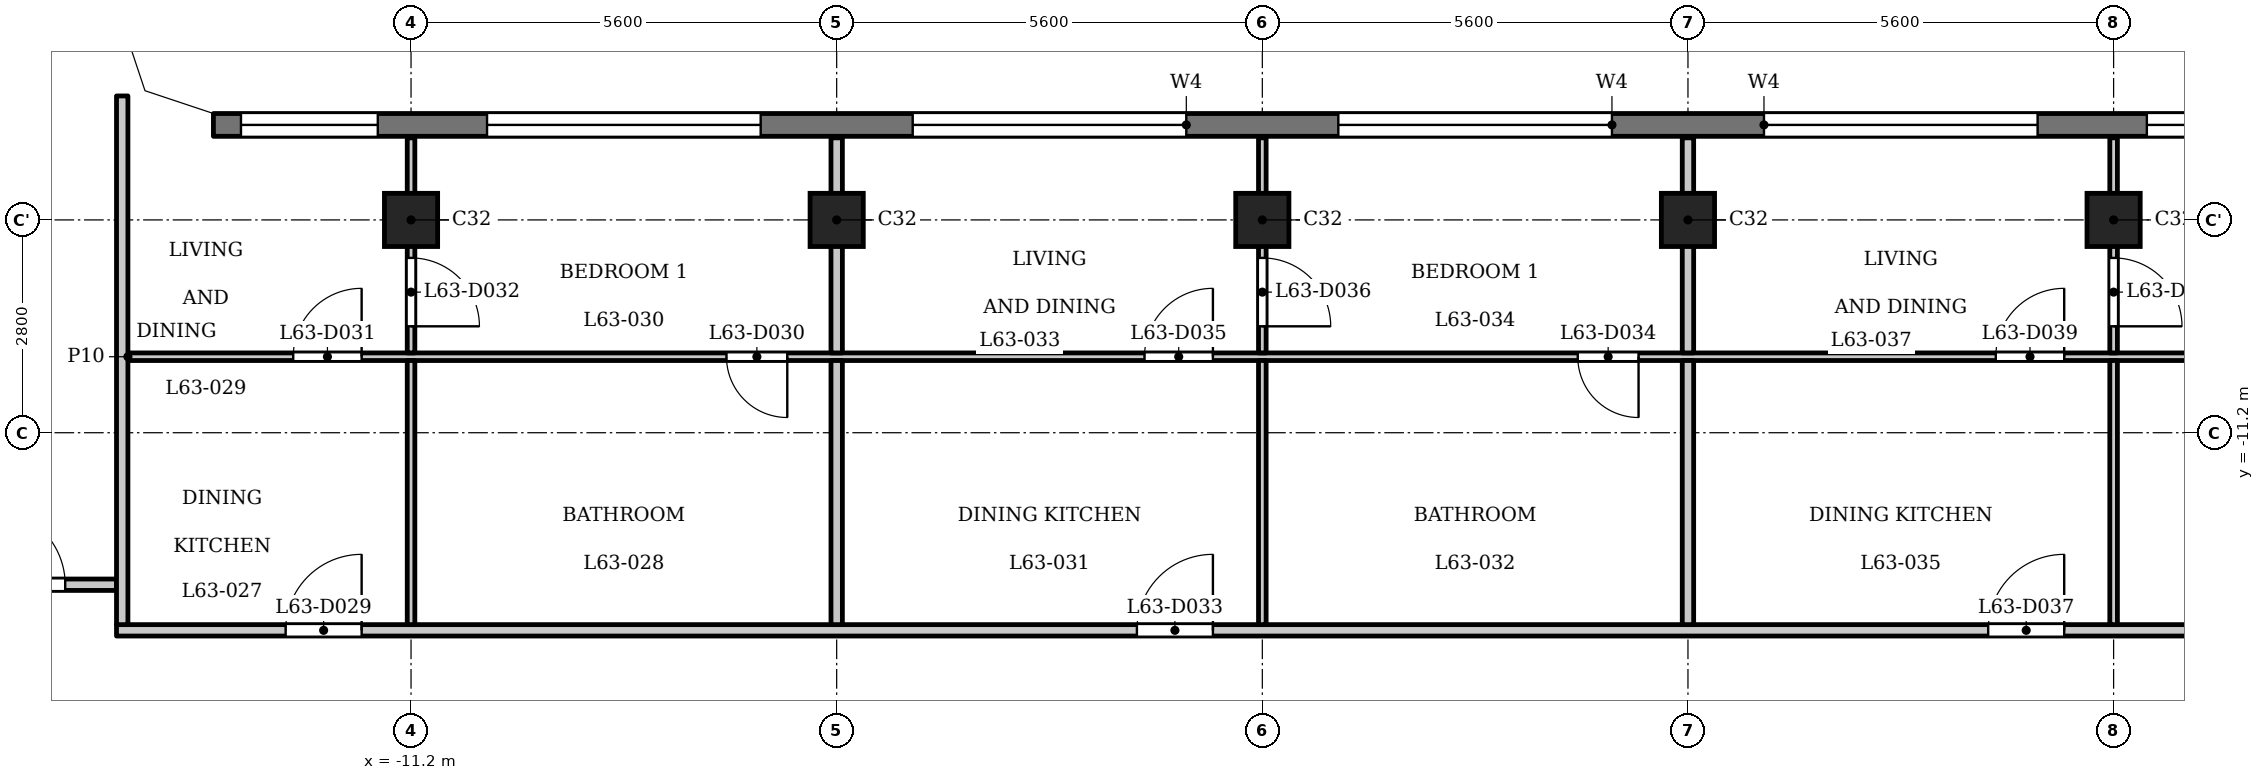
"""IFC4 building model, lengths in metres.
Left out: names, types, materials, properties, quantities, classifications, styles, units other than length and angle.
Written with IfcOpenShell. Run it as: python <this file> out.ifc"""

import sys

from ifc_helpers import new_model, si_unit, direction, frame, frame_2d, origin, origin_2d, place, context, subcontext, project, spatial, polyline, rectangle, outline, extrude, element, fill, save


model = new_model("IFC4")
c1 = context("Model", 3, precision=1e-05, world=origin(), true_north=direction((0.0, 1.0)))
c2 = subcontext(c1, "Body", "Model", "MODEL_VIEW")
j1 = project(units=[si_unit("LENGTHUNIT", "METRE"), si_unit("PLANEANGLEUNIT", "RADIAN")], contexts=[c1])
p1 = place(None, origin())
s1 = spatial("IfcSite", under=j1, at=p1, CompositionType="ELEMENT")
p2 = place(p1, origin())
s2 = spatial("IfcBuilding", under=s1, at=p2, CompositionType="ELEMENT")
p3 = place(p2, frame((0.0, 0.0, 245.2)))
s3 = spatial("IfcBuildingStorey", under=s2, at=p3, CompositionType="ELEMENT", Elevation=245.2)
for number, where, z_axis, x_axis in (
    (1, (-11.2, -8.4, 0.0), (0.0, 0.0, 1.0), (1.0, 0.0, 0.0)),
    (2, (-5.6, -8.4, 0.0), (0.0, 0.0, 1.0), (1.0, 0.0, 0.0)),
    (3, (0.0, -8.4, 0.0), (0.0, 0.0, 1.0), (1.0, 0.0, 0.0)),
    (4, (5.6, -8.4, 0.0), (0.0, 0.0, 1.0), (1.0, 0.0, 0.0)),
    (5, (11.2, -8.4, 0.0), (0.0, 0.0, 1.0), (1.0, 0.0, 0.0)),
):
    element("IfcColumn", number, at=place(p3, frame(where, z_axis=z_axis, x_axis=x_axis)), inside=s3, PredefinedType="COLUMN", context=c2, shape_type="SweptSolid", body=[
        extrude(rectangle(XDim=0.7, YDim=0.7, at=origin_2d()), origin(), (0.0, 0.0, 1.0), 3.5),
    ])
p4 = place(p3, frame((13.8, -7.15, 0.0), z_axis=(0.0, 0.0, 1.0), x_axis=(-1.0, 0.0, 0.0)))
e6 = element("IfcWall", 6, at=p4, inside=s3, PredefinedType="SOLIDWALL", context=c2, shape_type="SweptSolid", body=[
    extrude(rectangle(XDim=27.6, YDim=0.3, at=frame_2d((13.8, 0.0))), origin(), (0.0, 0.0, 1.0), 3.2),
])
p5 = place(p4, frame((0.363, 0.0, 0.9)))
e7 = element("IfcOpeningElement", 7, at=p5, cuts=e6, PredefinedType="OPENING", context=c2, shape_type="SweptSolid", body=[
    extrude(rectangle(XDim=1.8, YDim=1.25, at=frame_2d((0.9, 0.625))), frame((0.0, 0.16, 0.0), z_axis=(0.0, -1.0, 0.0), x_axis=(1.0, 0.0, 0.0)), (0.0, 0.0, 1.0), 0.32),
])
p6 = place(p4, frame((3.6, 0.0, 1.2)))
e8 = element("IfcOpeningElement", 8, at=p6, cuts=e6, PredefinedType="OPENING", context=c2, shape_type="SweptSolid", body=[
    extrude(rectangle(XDim=3.6, YDim=0.95, at=frame_2d((1.8, 0.475))), frame((0.0, 0.16, 0.0), z_axis=(0.0, -1.0, 0.0), x_axis=(1.0, 0.0, 0.0)), (0.0, 0.0, 1.0), 0.32),
])
p7 = place(p4, frame((9.2, 0.0, 1.2)))
e9 = element("IfcOpeningElement", 9, at=p7, cuts=e6, PredefinedType="OPENING", context=c2, shape_type="SweptSolid", body=[
    extrude(rectangle(XDim=3.6, YDim=0.95, at=frame_2d((1.8, 0.475))), frame((0.0, 0.16, 0.0), z_axis=(0.0, -1.0, 0.0), x_axis=(1.0, 0.0, 0.0)), (0.0, 0.0, 1.0), 0.32),
])
p8 = place(p4, frame((14.8, 0.0, 1.2)))
e10 = element("IfcOpeningElement", 10, at=p8, cuts=e6, PredefinedType="OPENING", context=c2, shape_type="SweptSolid", body=[
    extrude(rectangle(XDim=3.6, YDim=0.95, at=frame_2d((1.8, 0.475))), frame((0.0, 0.16, 0.0), z_axis=(0.0, -1.0, 0.0), x_axis=(1.0, 0.0, 0.0)), (0.0, 0.0, 1.0), 0.32),
])
p9 = place(p4, frame((20.4, 0.0, 1.2)))
e11 = element("IfcOpeningElement", 11, at=p9, cuts=e6, PredefinedType="OPENING", context=c2, shape_type="SweptSolid", body=[
    extrude(rectangle(XDim=3.6, YDim=0.95, at=frame_2d((1.8, 0.475))), frame((0.0, 0.16, 0.0), z_axis=(0.0, -1.0, 0.0), x_axis=(1.0, 0.0, 0.0)), (0.0, 0.0, 1.0), 0.32),
])
p10 = place(p4, frame((25.438, 0.0, 0.9)))
e12 = element("IfcOpeningElement", 12, at=p10, cuts=e6, PredefinedType="OPENING", context=c2, shape_type="SweptSolid", body=[
    extrude(rectangle(XDim=1.8, YDim=1.25, at=frame_2d((0.9, 0.625))), frame((0.0, 0.16, 0.0), z_axis=(0.0, -1.0, 0.0), x_axis=(1.0, 0.0, 0.0)), (0.0, 0.0, 1.0), 0.32),
])
p11 = place(p3, frame((-15.075, -13.8, 0.0), z_axis=(0.0, 0.0, 1.0), x_axis=(1.0, 0.0, 0.0)))
e13 = element("IfcWall", 13, at=p11, inside=s3, PredefinedType="PARTITIONING", context=c2, shape_type="SweptSolid", body=[
    extrude(rectangle(XDim=30.15, YDim=0.15, at=frame_2d((15.075, 0.0))), origin(), (0.0, 0.0, 1.0), 3.2),
])
p12 = place(p11, frame((2.225, 0.0, 0.0)))
e14 = element("IfcOpeningElement", 14, at=p12, cuts=e13, PredefinedType="OPENING", context=c2, shape_type="SweptSolid", body=[
    extrude(rectangle(XDim=1.0, YDim=2.1, at=frame_2d((0.5, 1.05))), frame((0.0, 0.085, 0.0), z_axis=(0.0, -1.0, 0.0), x_axis=(1.0, 0.0, 0.0)), (0.0, 0.0, 1.0), 0.17),
])
p13 = place(p11, frame((13.425, 0.0, 0.0)))
e15 = element("IfcOpeningElement", 15, at=p13, cuts=e13, PredefinedType="OPENING", context=c2, shape_type="SweptSolid", body=[
    extrude(rectangle(XDim=1.0, YDim=2.1, at=frame_2d((0.5, 1.05))), frame((0.0, 0.085, 0.0), z_axis=(0.0, -1.0, 0.0), x_axis=(1.0, 0.0, 0.0)), (0.0, 0.0, 1.0), 0.17),
])
p14 = place(p11, frame((24.625, 0.0, 0.0)))
e16 = element("IfcOpeningElement", 16, at=p14, cuts=e13, PredefinedType="OPENING", context=c2, shape_type="SweptSolid", body=[
    extrude(rectangle(XDim=1.0, YDim=2.1, at=frame_2d((0.5, 1.05))), frame((0.0, 0.085, 0.0), z_axis=(0.0, -1.0, 0.0), x_axis=(1.0, 0.0, 0.0)), (0.0, 0.0, 1.0), 0.17),
])
p15 = place(p3, frame((-17.4, -13.2, 0.0), z_axis=(0.0, 0.0, 1.0), x_axis=(1.0, 0.0, 0.0)))
e17 = element("IfcWall", 17, at=p15, inside=s3, PredefinedType="PARTITIONING", context=c2, shape_type="SweptSolid", body=[
    extrude(rectangle(XDim=2.325, YDim=0.15, at=frame_2d((1.163, 0.0))), origin(), (0.0, 0.0, 1.0), 3.2),
])
p16 = place(p15, frame((0.65, 0.0, 0.0)))
e18 = element("IfcOpeningElement", 18, at=p16, cuts=e17, PredefinedType="OPENING", context=c2, shape_type="SweptSolid", body=[
    extrude(rectangle(XDim=1.0, YDim=2.1, at=frame_2d((0.5, 1.05))), frame((0.0, 0.085, 0.0), z_axis=(0.0, -1.0, 0.0), x_axis=(1.0, 0.0, 0.0)), (0.0, 0.0, 1.0), 0.17),
])
p17 = place(p3, frame((-14.925, -10.2, 0.0), z_axis=(0.0, 0.0, 1.0), x_axis=(1.0, 0.0, 0.0)))
e19 = element("IfcWall", 19, at=p17, inside=s3, PredefinedType="PARTITIONING", context=c2, shape_type="SweptSolid", body=[
    extrude(rectangle(XDim=29.85, YDim=0.1, at=frame_2d((14.925, 0.0))), origin(), (0.0, 0.0, 1.0), 3.2),
])
p18 = place(p17, frame((7.875, 0.0, 0.0)))
e20 = element("IfcOpeningElement", 20, at=p18, cuts=e19, PredefinedType="OPENING", context=c2, shape_type="SweptSolid", body=[
    extrude(rectangle(XDim=0.8, YDim=2.1, at=frame_2d((0.4, 1.05))), frame((0.0, 0.06, 0.0), z_axis=(0.0, -1.0, 0.0), x_axis=(1.0, 0.0, 0.0)), (0.0, 0.0, 1.0), 0.12),
])
p19 = place(p17, frame((2.175, 0.0, 0.0)))
e21 = element("IfcOpeningElement", 21, at=p19, cuts=e19, PredefinedType="OPENING", context=c2, shape_type="SweptSolid", body=[
    extrude(rectangle(XDim=0.9, YDim=2.1, at=frame_2d((0.45, 1.05))), frame((0.0, 0.06, 0.0), z_axis=(0.0, -1.0, 0.0), x_axis=(1.0, 0.0, 0.0)), (0.0, 0.0, 1.0), 0.12),
])
p20 = place(p17, frame((19.075, 0.0, 0.0)))
e22 = element("IfcOpeningElement", 22, at=p20, cuts=e19, PredefinedType="OPENING", context=c2, shape_type="SweptSolid", body=[
    extrude(rectangle(XDim=0.8, YDim=2.1, at=frame_2d((0.4, 1.05))), frame((0.0, 0.06, 0.0), z_axis=(0.0, -1.0, 0.0), x_axis=(1.0, 0.0, 0.0)), (0.0, 0.0, 1.0), 0.12),
])
p21 = place(p17, frame((13.375, 0.0, 0.0)))
e23 = element("IfcOpeningElement", 23, at=p21, cuts=e19, PredefinedType="OPENING", context=c2, shape_type="SweptSolid", body=[
    extrude(rectangle(XDim=0.9, YDim=2.1, at=frame_2d((0.45, 1.05))), frame((0.0, 0.06, 0.0), z_axis=(0.0, -1.0, 0.0), x_axis=(1.0, 0.0, 0.0)), (0.0, 0.0, 1.0), 0.12),
])
p22 = place(p17, frame((28.525, 0.0, 0.0)))
e24 = element("IfcOpeningElement", 24, at=p22, cuts=e19, PredefinedType="OPENING", context=c2, shape_type="SweptSolid", body=[
    extrude(rectangle(XDim=0.8, YDim=2.1, at=frame_2d((0.4, 1.05))), frame((0.0, 0.06, 0.0), z_axis=(0.0, -1.0, 0.0), x_axis=(1.0, 0.0, 0.0)), (0.0, 0.0, 1.0), 0.12),
])
p23 = place(p17, frame((24.575, 0.0, 0.0)))
e25 = element("IfcOpeningElement", 25, at=p23, cuts=e19, PredefinedType="OPENING", context=c2, shape_type="SweptSolid", body=[
    extrude(rectangle(XDim=0.9, YDim=2.1, at=frame_2d((0.45, 1.05))), frame((0.0, 0.06, 0.0), z_axis=(0.0, -1.0, 0.0), x_axis=(1.0, 0.0, 0.0)), (0.0, 0.0, 1.0), 0.12),
])
p24 = place(p3, frame((-15.0, -13.725, 0.0), z_axis=(0.0, 0.0, 1.0), x_axis=(0.0, 1.0, 0.0)))
e26 = element("IfcWall", 26, at=p24, inside=s3, PredefinedType="PARTITIONING", context=c2, shape_type="SweptSolid", body=[
    extrude(rectangle(XDim=6.956, YDim=0.15, at=frame_2d((3.478, 0.0))), origin(), (0.0, 0.0, 1.0), 3.2),
])
p25 = place(p3, frame((-11.2, -13.725, 0.0), z_axis=(0.0, 0.0, 1.0), x_axis=(0.0, 1.0, 0.0)))
e27 = element("IfcWall", 27, at=p25, inside=s3, PredefinedType="PARTITIONING", context=c2, shape_type="SweptSolid", body=[
    extrude(rectangle(XDim=3.475, YDim=0.1, at=frame_2d((1.738, 0.0))), origin(), (0.0, 0.0, 1.0), 3.2),
])
p26 = place(p3, frame((-11.2, -10.15, 0.0), z_axis=(0.0, 0.0, 1.0), x_axis=(0.0, 1.0, 0.0)))
e28 = element("IfcWall", 28, at=p26, inside=s3, PredefinedType="PARTITIONING", context=c2, shape_type="SweptSolid", body=[
    extrude(rectangle(XDim=2.83, YDim=0.1, at=frame_2d((1.415, 0.0))), origin(), (0.0, 0.0, 1.0), 3.2),
])
p27 = place(p26, frame((0.35, 0.0, 0.0)))
e29 = element("IfcOpeningElement", 29, at=p27, cuts=e28, PredefinedType="OPENING", context=c2, shape_type="SweptSolid", body=[
    extrude(rectangle(XDim=0.9, YDim=2.1, at=frame_2d((0.45, 1.05))), frame((0.0, 0.06, 0.0), z_axis=(0.0, -1.0, 0.0), x_axis=(1.0, 0.0, 0.0)), (0.0, 0.0, 1.0), 0.12),
])
p28 = place(p3, frame((-5.6, -13.725, 0.0), z_axis=(0.0, 0.0, 1.0), x_axis=(0.0, 1.0, 0.0)))
e30 = element("IfcWall", 30, at=p28, inside=s3, PredefinedType="PARTITIONING", context=c2, shape_type="SweptSolid", body=[
    extrude(rectangle(XDim=3.475, YDim=0.15, at=frame_2d((1.738, 0.0))), origin(), (0.0, 0.0, 1.0), 3.2),
])
p29 = place(p3, frame((-5.6, -10.15, 0.0), z_axis=(0.0, 0.0, 1.0), x_axis=(0.0, 1.0, 0.0)))
e31 = element("IfcWall", 31, at=p29, inside=s3, PredefinedType="PARTITIONING", context=c2, shape_type="SweptSolid", body=[
    extrude(rectangle(XDim=2.83, YDim=0.15, at=frame_2d((1.415, 0.0))), origin(), (0.0, 0.0, 1.0), 3.2),
])
p30 = place(p3, frame((0.0, -13.725, 0.0), z_axis=(0.0, 0.0, 1.0), x_axis=(0.0, 1.0, 0.0)))
e32 = element("IfcWall", 32, at=p30, inside=s3, PredefinedType="PARTITIONING", context=c2, shape_type="SweptSolid", body=[
    extrude(rectangle(XDim=3.475, YDim=0.1, at=frame_2d((1.738, 0.0))), origin(), (0.0, 0.0, 1.0), 3.2),
])
p31 = place(p3, frame((0.0, -10.15, 0.0), z_axis=(0.0, 0.0, 1.0), x_axis=(0.0, 1.0, 0.0)))
e33 = element("IfcWall", 33, at=p31, inside=s3, PredefinedType="PARTITIONING", context=c2, shape_type="SweptSolid", body=[
    extrude(rectangle(XDim=2.83, YDim=0.1, at=frame_2d((1.415, 0.0))), origin(), (0.0, 0.0, 1.0), 3.2),
])
p32 = place(p31, frame((0.35, 0.0, 0.0)))
e34 = element("IfcOpeningElement", 34, at=p32, cuts=e33, PredefinedType="OPENING", context=c2, shape_type="SweptSolid", body=[
    extrude(rectangle(XDim=0.9, YDim=2.1, at=frame_2d((0.45, 1.05))), frame((0.0, 0.06, 0.0), z_axis=(0.0, -1.0, 0.0), x_axis=(1.0, 0.0, 0.0)), (0.0, 0.0, 1.0), 0.12),
])
p33 = place(p3, frame((5.6, -13.725, 0.0), z_axis=(0.0, 0.0, 1.0), x_axis=(0.0, 1.0, 0.0)))
e35 = element("IfcWall", 35, at=p33, inside=s3, PredefinedType="PARTITIONING", context=c2, shape_type="SweptSolid", body=[
    extrude(rectangle(XDim=3.475, YDim=0.15, at=frame_2d((1.738, 0.0))), origin(), (0.0, 0.0, 1.0), 3.2),
])
p34 = place(p3, frame((5.6, -10.15, 0.0), z_axis=(0.0, 0.0, 1.0), x_axis=(0.0, 1.0, 0.0)))
e36 = element("IfcWall", 36, at=p34, inside=s3, PredefinedType="PARTITIONING", context=c2, shape_type="SweptSolid", body=[
    extrude(rectangle(XDim=2.83, YDim=0.15, at=frame_2d((1.415, 0.0))), origin(), (0.0, 0.0, 1.0), 3.2),
])
p35 = place(p3, frame((11.2, -13.725, 0.0), z_axis=(0.0, 0.0, 1.0), x_axis=(0.0, 1.0, 0.0)))
e37 = element("IfcWall", 37, at=p35, inside=s3, PredefinedType="PARTITIONING", context=c2, shape_type="SweptSolid", body=[
    extrude(rectangle(XDim=3.475, YDim=0.1, at=frame_2d((1.738, 0.0))), origin(), (0.0, 0.0, 1.0), 3.2),
])
p36 = place(p3, frame((11.2, -10.15, 0.0), z_axis=(0.0, 0.0, 1.0), x_axis=(0.0, 1.0, 0.0)))
e38 = element("IfcWall", 38, at=p36, inside=s3, PredefinedType="PARTITIONING", context=c2, shape_type="SweptSolid", body=[
    extrude(rectangle(XDim=2.83, YDim=0.1, at=frame_2d((1.415, 0.0))), origin(), (0.0, 0.0, 1.0), 3.2),
])
p37 = place(p36, frame((0.35, 0.0, 0.0)))
e39 = element("IfcOpeningElement", 39, at=p37, cuts=e38, PredefinedType="OPENING", context=c2, shape_type="SweptSolid", body=[
    extrude(rectangle(XDim=0.9, YDim=2.1, at=frame_2d((0.45, 1.05))), frame((0.0, 0.06, 0.0), z_axis=(0.0, -1.0, 0.0), x_axis=(1.0, 0.0, 0.0)), (0.0, 0.0, 1.0), 0.12),
])
p38 = place(p3, origin())
e40 = element("IfcWall", 40, at=p38, inside=s3, PredefinedType="SOLIDWALL", context=c2, shape_type="SweptSolid", body=[
    extrude(outline(polyline([(-14.937, -6.937), (-13.849, -7.3), (-13.8, -7.3), (-13.8, -7.0), (-14.7, -6.7), (-15.0, -5.8), (-15.3, -5.8), (-15.3, -5.849), (-14.937, -6.937)])), origin(), (0.0, 0.0, 1.0), 3.2),
])
p39 = place(p16, origin())
e41 = element("IfcDoor", 41, at=p39, inside=s3, OperationType="SINGLE_SWING_RIGHT", PredefinedType="DOOR", context=c2, shape_type="SweptSolid", body=[
    extrude(rectangle(XDim=1.0, YDim=2.1, at=frame_2d((0.5, 1.05))), frame((0.0, 0.025, 0.0), z_axis=(0.0, -1.0, 0.0), x_axis=(1.0, 0.0, 0.0)), (0.0, 0.0, 1.0), 0.05),
])
fill(e18, e41)
p40 = place(p12, origin())
e42 = element("IfcDoor", 42, at=p40, inside=s3, OperationType="SINGLE_SWING_LEFT", PredefinedType="DOOR", context=c2, shape_type="SweptSolid", body=[
    extrude(rectangle(XDim=1.0, YDim=2.1, at=frame_2d((0.5, 1.05))), frame((0.0, 0.025, 0.0), z_axis=(0.0, -1.0, 0.0), x_axis=(1.0, 0.0, 0.0)), (0.0, 0.0, 1.0), 0.05),
])
fill(e14, e42)
p41 = place(p18, origin())
e43 = element("IfcDoor", 43, at=p41, inside=s3, OperationType="SINGLE_SWING_RIGHT", PredefinedType="DOOR", context=c2, shape_type="SweptSolid", body=[
    extrude(rectangle(XDim=0.8, YDim=2.1, at=frame_2d((0.4, 1.05))), frame((0.0, 0.025, 0.0), z_axis=(0.0, -1.0, 0.0), x_axis=(1.0, 0.0, 0.0)), (0.0, 0.0, 1.0), 0.05),
])
fill(e20, e43)
p42 = place(p19, origin())
e44 = element("IfcDoor", 44, at=p42, inside=s3, OperationType="SINGLE_SWING_LEFT", PredefinedType="DOOR", context=c2, shape_type="SweptSolid", body=[
    extrude(rectangle(XDim=0.9, YDim=2.1, at=frame_2d((0.45, 1.05))), frame((0.0, 0.025, 0.0), z_axis=(0.0, -1.0, 0.0), x_axis=(1.0, 0.0, 0.0)), (0.0, 0.0, 1.0), 0.05),
])
fill(e21, e44)
p43 = place(p27, origin())
e45 = element("IfcDoor", 45, at=p43, inside=s3, OperationType="SINGLE_SWING_LEFT", PredefinedType="DOOR", context=c2, shape_type="SweptSolid", body=[
    extrude(rectangle(XDim=0.9, YDim=2.1, at=frame_2d((0.45, 1.05))), frame((0.0, 0.025, 0.0), z_axis=(0.0, -1.0, 0.0), x_axis=(1.0, 0.0, 0.0)), (0.0, 0.0, 1.0), 0.05),
])
fill(e29, e45)
p44 = place(p13, origin())
e46 = element("IfcDoor", 46, at=p44, inside=s3, OperationType="SINGLE_SWING_LEFT", PredefinedType="DOOR", context=c2, shape_type="SweptSolid", body=[
    extrude(rectangle(XDim=1.0, YDim=2.1, at=frame_2d((0.5, 1.05))), frame((0.0, 0.025, 0.0), z_axis=(0.0, -1.0, 0.0), x_axis=(1.0, 0.0, 0.0)), (0.0, 0.0, 1.0), 0.05),
])
fill(e15, e46)
p45 = place(p20, origin())
e47 = element("IfcDoor", 47, at=p45, inside=s3, OperationType="SINGLE_SWING_RIGHT", PredefinedType="DOOR", context=c2, shape_type="SweptSolid", body=[
    extrude(rectangle(XDim=0.8, YDim=2.1, at=frame_2d((0.4, 1.05))), frame((0.0, 0.025, 0.0), z_axis=(0.0, -1.0, 0.0), x_axis=(1.0, 0.0, 0.0)), (0.0, 0.0, 1.0), 0.05),
])
fill(e22, e47)
p46 = place(p21, origin())
e48 = element("IfcDoor", 48, at=p46, inside=s3, OperationType="SINGLE_SWING_LEFT", PredefinedType="DOOR", context=c2, shape_type="SweptSolid", body=[
    extrude(rectangle(XDim=0.9, YDim=2.1, at=frame_2d((0.45, 1.05))), frame((0.0, 0.025, 0.0), z_axis=(0.0, -1.0, 0.0), x_axis=(1.0, 0.0, 0.0)), (0.0, 0.0, 1.0), 0.05),
])
fill(e23, e48)
p47 = place(p32, origin())
e49 = element("IfcDoor", 49, at=p47, inside=s3, OperationType="SINGLE_SWING_LEFT", PredefinedType="DOOR", context=c2, shape_type="SweptSolid", body=[
    extrude(rectangle(XDim=0.9, YDim=2.1, at=frame_2d((0.45, 1.05))), frame((0.0, 0.025, 0.0), z_axis=(0.0, -1.0, 0.0), x_axis=(1.0, 0.0, 0.0)), (0.0, 0.0, 1.0), 0.05),
])
fill(e34, e49)
p48 = place(p14, origin())
e50 = element("IfcDoor", 50, at=p48, inside=s3, OperationType="SINGLE_SWING_LEFT", PredefinedType="DOOR", context=c2, shape_type="SweptSolid", body=[
    extrude(rectangle(XDim=1.0, YDim=2.1, at=frame_2d((0.5, 1.05))), frame((0.0, 0.025, 0.0), z_axis=(0.0, -1.0, 0.0), x_axis=(1.0, 0.0, 0.0)), (0.0, 0.0, 1.0), 0.05),
])
fill(e16, e50)
p49 = place(p23, origin())
e51 = element("IfcDoor", 51, at=p49, inside=s3, OperationType="SINGLE_SWING_LEFT", PredefinedType="DOOR", context=c2, shape_type="SweptSolid", body=[
    extrude(rectangle(XDim=0.9, YDim=2.1, at=frame_2d((0.45, 1.05))), frame((0.0, 0.025, 0.0), z_axis=(0.0, -1.0, 0.0), x_axis=(1.0, 0.0, 0.0)), (0.0, 0.0, 1.0), 0.05),
])
fill(e25, e51)
p50 = place(p37, origin())
e52 = element("IfcDoor", 52, at=p50, inside=s3, OperationType="SINGLE_SWING_LEFT", PredefinedType="DOOR", context=c2, shape_type="SweptSolid", body=[
    extrude(rectangle(XDim=0.9, YDim=2.1, at=frame_2d((0.45, 1.05))), frame((0.0, 0.025, 0.0), z_axis=(0.0, -1.0, 0.0), x_axis=(1.0, 0.0, 0.0)), (0.0, 0.0, 1.0), 0.05),
])
fill(e39, e52)
p51 = place(p5, origin())
e53 = element("IfcWindow", 53, at=p51, inside=s3, PartitioningType="SINGLE_PANEL", PredefinedType="WINDOW", context=c2, shape_type="SweptSolid", body=[
    extrude(rectangle(XDim=1.8, YDim=1.25, at=frame_2d((0.9, 0.625))), frame((0.0, 0.03, 0.0), z_axis=(0.0, -1.0, 0.0), x_axis=(1.0, 0.0, 0.0)), (0.0, 0.0, 1.0), 0.06),
])
fill(e7, e53)
p52 = place(p6, origin())
e54 = element("IfcWindow", 54, at=p52, inside=s3, PartitioningType="SINGLE_PANEL", PredefinedType="WINDOW", context=c2, shape_type="SweptSolid", body=[
    extrude(rectangle(XDim=3.6, YDim=0.95, at=frame_2d((1.8, 0.475))), frame((0.0, 0.03, 0.0), z_axis=(0.0, -1.0, 0.0), x_axis=(1.0, 0.0, 0.0)), (0.0, 0.0, 1.0), 0.06),
])
fill(e8, e54)
p53 = place(p7, origin())
e55 = element("IfcWindow", 55, at=p53, inside=s3, PartitioningType="SINGLE_PANEL", PredefinedType="WINDOW", context=c2, shape_type="SweptSolid", body=[
    extrude(rectangle(XDim=3.6, YDim=0.95, at=frame_2d((1.8, 0.475))), frame((0.0, 0.03, 0.0), z_axis=(0.0, -1.0, 0.0), x_axis=(1.0, 0.0, 0.0)), (0.0, 0.0, 1.0), 0.06),
])
fill(e9, e55)
p54 = place(p8, origin())
e56 = element("IfcWindow", 56, at=p54, inside=s3, PartitioningType="SINGLE_PANEL", PredefinedType="WINDOW", context=c2, shape_type="SweptSolid", body=[
    extrude(rectangle(XDim=3.6, YDim=0.95, at=frame_2d((1.8, 0.475))), frame((0.0, 0.03, 0.0), z_axis=(0.0, -1.0, 0.0), x_axis=(1.0, 0.0, 0.0)), (0.0, 0.0, 1.0), 0.06),
])
fill(e10, e56)
p55 = place(p9, origin())
e57 = element("IfcWindow", 57, at=p55, inside=s3, PartitioningType="SINGLE_PANEL", PredefinedType="WINDOW", context=c2, shape_type="SweptSolid", body=[
    extrude(rectangle(XDim=3.6, YDim=0.95, at=frame_2d((1.8, 0.475))), frame((0.0, 0.03, 0.0), z_axis=(0.0, -1.0, 0.0), x_axis=(1.0, 0.0, 0.0)), (0.0, 0.0, 1.0), 0.06),
])
fill(e11, e57)
p56 = place(p10, origin())
e58 = element("IfcWindow", 58, at=p56, inside=s3, PartitioningType="SINGLE_PANEL", PredefinedType="WINDOW", context=c2, shape_type="SweptSolid", body=[
    extrude(rectangle(XDim=1.8, YDim=1.25, at=frame_2d((0.9, 0.625))), frame((0.0, 0.03, 0.0), z_axis=(0.0, -1.0, 0.0), x_axis=(1.0, 0.0, 0.0)), (0.0, 0.0, 1.0), 0.06),
])
fill(e12, e58)
save(model, sys.argv[1])
